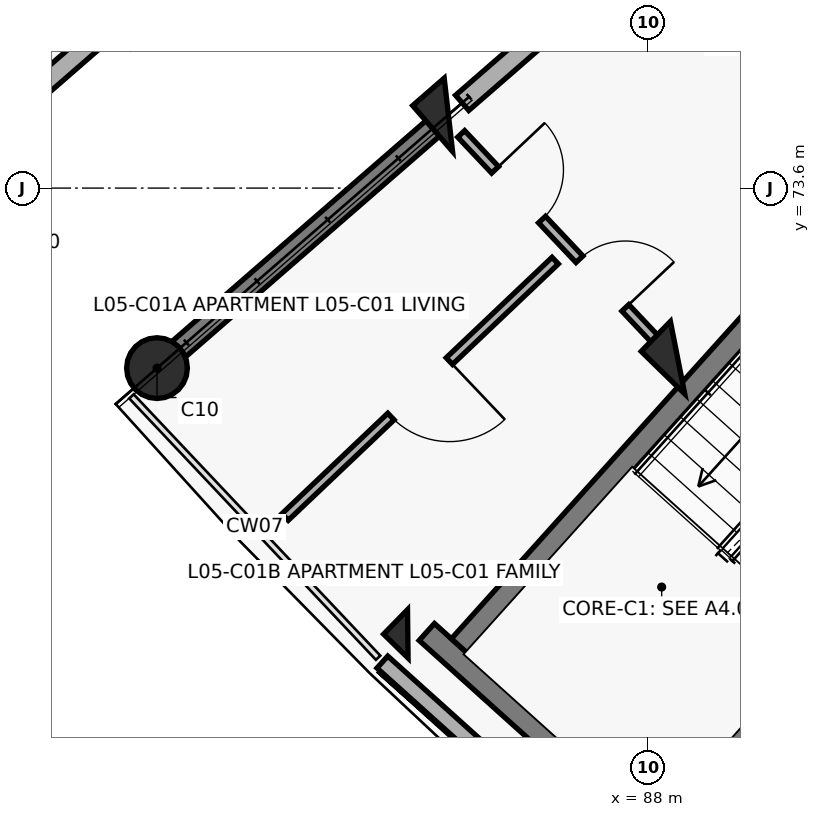
"""IFC4 building model, lengths in metres.
Left out: names, types, materials, properties, quantities, classifications, styles, units other than length and angle.
Written with IfcOpenShell. Run it as: python <this file> out.ifc"""

import sys

from ifc_helpers import new_model, si_unit, direction, frame, frame_2d, origin, origin_2d, place, context, subcontext, project, spatial, rectangle, circle, extrude, element, fill, save


model = new_model("IFC4")
c1 = context("Model", 3, precision=1e-05, world=origin(), true_north=direction((0.0, 1.0)))
c2 = subcontext(c1, "Body", "Model", "MODEL_VIEW")
j1 = project(units=[si_unit("LENGTHUNIT", "METRE"), si_unit("PLANEANGLEUNIT", "RADIAN")], contexts=[c1])
p1 = place(None, origin())
s1 = spatial("IfcSite", under=j1, at=p1, CompositionType="ELEMENT")
p2 = place(p1, origin())
s2 = spatial("IfcBuilding", under=s1, at=p2, CompositionType="ELEMENT")
p3 = place(p2, frame((0.0, 0.0, 17.4)))
s3 = spatial("IfcBuildingStorey", under=s2, at=p3, CompositionType="ELEMENT", Elevation=17.4)
p4 = place(p3, frame((85.377, 74.564, 0.0), z_axis=(0.0, 0.0, 1.0), x_axis=(-0.754709580223, -0.656059028991, 0.0)))
e1 = element("IfcColumn", 1, at=p4, inside=s3, PredefinedType="COLUMN", context=c2, shape_type="SweptSolid", body=[
    extrude(rectangle(XDim=0.55, YDim=0.8, at=origin_2d()), origin(), (0.0, 0.0, 1.0), 3.1),
])
p5 = place(p3, frame((81.543, 71.231, 0.0), z_axis=(0.0, 0.0, 1.0), x_axis=(-0.754709580223, -0.656059028991, 0.0)))
e2 = element("IfcColumn", 2, at=p5, inside=s3, PredefinedType="COLUMN", context=c2, shape_type="SweptSolid", body=[
    extrude(circle(Radius=0.4, at=origin_2d()), origin(), (0.0, 0.0, 1.0), 3.1),
])
p6 = place(p3, frame((88.392, 71.369, 0.0), z_axis=(0.0, 0.0, 1.0), x_axis=(-0.698665066769, -0.715448897181, 0.0)))
e3 = element("IfcColumn", 3, at=p6, inside=s3, PredefinedType="COLUMN", context=c2, shape_type="SweptSolid", body=[
    extrude(rectangle(XDim=0.55, YDim=0.8, at=origin_2d()), origin(), (0.0, 0.0, 1.0), 3.1),
])
p7 = place(p3, frame((84.843, 67.734, 0.0), z_axis=(0.0, 0.0, 1.0), x_axis=(-0.698665066769, -0.715448897181, 0.0)))
e4 = element("IfcColumn", 4, at=p7, inside=s3, PredefinedType="COLUMN", context=c2, shape_type="SweptSolid", body=[
    extrude(rectangle(XDim=0.45, YDim=0.45, at=origin_2d()), origin(), (0.0, 0.0, 1.0), 3.1),
])
p8 = place(p3, frame((85.241, 74.446, 0.0), z_axis=(0.0, 0.0, 1.0), x_axis=(-0.754703505217, -0.65606601742, 0.0)))
e5 = element("IfcWall", 5, at=p8, inside=s3, PredefinedType="SHEAR", context=c2, shape_type="SweptSolid", body=[
    extrude(rectangle(XDim=4.72, YDim=0.27, at=frame_2d((2.36, 0.0))), origin(), (0.0, 0.0, 1.0), 2.86),
])
p9 = place(p3, frame((79.234, 74.259, 0.0), z_axis=(0.0, 0.0, 1.0), x_axis=(0.754717680958, 0.656049710044, 0.0)))
e6 = element("IfcWall", 6, at=p9, inside=s3, PredefinedType="SOLIDWALL", context=c2, shape_type="SweptSolid", body=[
    extrude(rectangle(XDim=8.2, YDim=0.265, at=frame_2d((4.1, 0.0))), origin(), (0.0, 0.0, 1.0), 2.18),
])
p10 = place(p9, frame((3.59, 0.0, 0.75)))
e7 = element("IfcOpeningElement", 7, at=p10, cuts=e6, PredefinedType="OPENING", context=c2, shape_type="SweptSolid", body=[
    extrude(rectangle(XDim=1.35, YDim=1.35, at=frame_2d((0.675, 0.675))), frame((0.0, 0.142, 0.0), z_axis=(0.0, -1.0, 0.0), x_axis=(1.0, 0.0, 0.0)), (0.0, 0.0, 1.0), 0.285),
])
p11 = place(p3, frame((84.508, 67.363, 0.0), z_axis=(0.0, 0.0, 1.0), x_axis=(0.743387539862, -0.668860946369, 0.0)))
e8 = element("IfcWall", 8, at=p11, inside=s3, PredefinedType="SOLIDWALL", context=c2, shape_type="SweptSolid", body=[
    extrude(rectangle(XDim=4.809, YDim=0.212, at=frame_2d((2.405, 0.0))), origin(), (0.0, 0.0, 1.0), 2.25),
])
p12 = place(p3, frame((91.746, 80.101, 0.0), z_axis=(0.0, 0.0, 1.0), x_axis=(-0.754704866158, -0.656064451862, 0.0)))
e9 = element("IfcWall", 9, at=p12, inside=s3, PredefinedType="SOLIDWALL", context=c2, shape_type="SweptSolid", body=[
    extrude(rectangle(XDim=8.2, YDim=0.265, at=frame_2d((4.1, 0.0))), origin(), (0.0, 0.0, 1.0), 2.18),
])
p13 = place(p12, frame((3.59, 0.0, 0.75)))
e10 = element("IfcOpeningElement", 10, at=p13, cuts=e9, PredefinedType="OPENING", context=c2, shape_type="SweptSolid", body=[
    extrude(rectangle(XDim=1.35, YDim=1.35, at=frame_2d((0.675, 0.675))), frame((0.0, 0.142, 0.0), z_axis=(0.0, -1.0, 0.0), x_axis=(1.0, 0.0, 0.0)), (0.0, 0.0, 1.0), 0.285),
])
p14 = place(p3, frame((85.093, 67.76, 0.0), z_axis=(0.0, 0.0, 1.0), x_axis=(0.743372896184, -0.668877221333, 0.0)))
e11 = element("IfcWall", 11, at=p14, inside=s3, PredefinedType="SHEAR", context=c2, shape_type="SweptSolid", body=[
    extrude(rectangle(XDim=4.47, YDim=0.3, at=frame_2d((2.235, 0.0))), origin(), (0.0, 0.0, 1.0), 3.1),
])
p15 = place(p3, frame((90.671, 73.287, 0.0), z_axis=(0.0, 0.0, 1.0), x_axis=(-0.668885797871, -0.743365179038, 0.0)))
e12 = element("IfcWall", 12, at=p15, inside=s3, PredefinedType="SHEAR", context=c2, shape_type="SweptSolid", body=[
    extrude(rectangle(XDim=7.69, YDim=0.3, at=frame_2d((3.845, 0.0))), origin(), (0.0, 0.0, 1.0), 3.1),
])
p16 = place(p3, frame((93.325, 70.899, 0.0), z_axis=(0.0, 0.0, 1.0), x_axis=(-0.668868253964, -0.743380964808, 0.0)))
e13 = element("IfcWall", 13, at=p16, inside=s3, PredefinedType="SHEAR", context=c2, shape_type="SweptSolid", body=[
    extrude(rectangle(XDim=7.69, YDim=0.3, at=frame_2d((3.845, 0.0))), origin(), (0.0, 0.0, 1.0), 3.1),
])
p17 = place(p3, frame((87.994, 76.376, 0.0), z_axis=(0.0, 0.0, 1.0), x_axis=(0.686310507227, -0.727308660522, 0.0)))
e14 = element("IfcWall", 14, at=p17, inside=s3, PredefinedType="SOLIDWALL", context=c2, shape_type="SweptSolid", body=[
    extrude(rectangle(XDim=3.436, YDim=0.19, at=frame_2d((1.718, 0.0))), origin(), (0.0, 0.0, 1.0), 2.08),
])
p18 = place(p17, frame((1.208, 0.0, 0.0)))
e15 = element("IfcOpeningElement", 15, at=p18, cuts=e14, PredefinedType="OPENING", context=c2, shape_type="SweptSolid", body=[
    extrude(rectangle(XDim=1.02, YDim=2.15, at=frame_2d((0.51, 1.075))), frame((0.0, 0.105, 0.0), z_axis=(0.0, -1.0, 0.0), x_axis=(1.0, 0.0, 0.0)), (0.0, 0.0, 1.0), 0.21),
])
p19 = place(p3, frame((85.545, 74.313, 0.0), z_axis=(0.0, 0.0, 1.0), x_axis=(0.686332741542, -0.727287678906, 0.0)))
e16 = element("IfcWall", 16, at=p19, inside=s3, PredefinedType="PARTITIONING", context=c2, shape_type="SweptSolid", body=[
    extrude(rectangle(XDim=3.797, YDim=0.125, at=frame_2d((1.899, 0.0))), origin(), (0.0, 0.0, 1.0), 2.08),
])
p20 = place(p19, frame((0.65, 0.0, 0.0)))
e17 = element("IfcOpeningElement", 17, at=p20, cuts=e16, PredefinedType="OPENING", context=c2, shape_type="SweptSolid", body=[
    extrude(rectangle(XDim=0.9, YDim=2.1, at=frame_2d((0.45, 1.05))), frame((0.0, 0.073, 0.0), z_axis=(0.0, -1.0, 0.0), x_axis=(1.0, 0.0, 0.0)), (0.0, 0.0, 1.0), 0.145),
])
p21 = place(p19, frame((2.267, 0.0, 0.0)))
e18 = element("IfcOpeningElement", 18, at=p21, cuts=e16, PredefinedType="OPENING", context=c2, shape_type="SweptSolid", body=[
    extrude(rectangle(XDim=0.88, YDim=2.1, at=frame_2d((0.44, 1.05))), frame((0.0, 0.073, 0.0), z_axis=(0.0, -1.0, 0.0), x_axis=(1.0, 0.0, 0.0)), (0.0, 0.0, 1.0), 0.145),
])
p22 = place(p3, frame((86.782, 72.646, 0.0), z_axis=(0.0, 0.0, 1.0), x_axis=(-0.725204659953, -0.688533369694, 0.0)))
e19 = element("IfcWall", 19, at=p22, inside=s3, PredefinedType="PARTITIONING", context=c2, shape_type="SweptSolid", body=[
    extrude(rectangle(XDim=4.9, YDim=0.12, at=frame_2d((2.45, 0.0))), origin(), (0.0, 0.0, 1.0), 2.08),
])
p23 = place(p22, frame((1.92, 0.0, 0.0)))
e20 = element("IfcOpeningElement", 20, at=p23, cuts=e19, PredefinedType="OPENING", context=c2, shape_type="SweptSolid", body=[
    extrude(rectangle(XDim=1.06, YDim=2.1, at=frame_2d((0.53, 1.05))), frame((0.0, 0.07, 0.0), z_axis=(0.0, -1.0, 0.0), x_axis=(1.0, 0.0, 0.0)), (0.0, 0.0, 1.0), 0.14),
])
p24 = place(p18, origin())
e21 = element("IfcDoor", 21, at=p24, inside=s3, OperationType="SINGLE_SWING_LEFT", PredefinedType="DOOR", context=c2, shape_type="SweptSolid", body=[
    extrude(rectangle(XDim=1.02, YDim=2.15, at=frame_2d((0.51, 1.075))), frame((0.0, 0.025, 0.0), z_axis=(0.0, -1.0, 0.0), x_axis=(1.0, 0.0, 0.0)), (0.0, 0.0, 1.0), 0.05),
])
fill(e15, e21)
p25 = place(p20, origin())
e22 = element("IfcDoor", 22, at=p25, inside=s3, OperationType="SINGLE_SWING_LEFT", PredefinedType="DOOR", context=c2, shape_type="SweptSolid", body=[
    extrude(rectangle(XDim=0.9, YDim=2.1, at=frame_2d((0.45, 1.05))), frame((0.0, 0.025, 0.0), z_axis=(0.0, -1.0, 0.0), x_axis=(1.0, 0.0, 0.0)), (0.0, 0.0, 1.0), 0.05),
])
fill(e17, e22)
p26 = place(p21, origin())
e23 = element("IfcDoor", 23, at=p26, inside=s3, OperationType="SINGLE_SWING_RIGHT", PredefinedType="DOOR", context=c2, shape_type="SweptSolid", body=[
    extrude(rectangle(XDim=0.88, YDim=2.1, at=frame_2d((0.44, 1.05))), frame((0.0, 0.025, 0.0), z_axis=(0.0, -1.0, 0.0), x_axis=(1.0, 0.0, 0.0)), (0.0, 0.0, 1.0), 0.05),
])
fill(e18, e23)
p27 = place(p23, origin())
e24 = element("IfcDoor", 24, at=p27, inside=s3, OperationType="SINGLE_SWING_LEFT", PredefinedType="DOOR", context=c2, shape_type="SweptSolid", body=[
    extrude(rectangle(XDim=1.06, YDim=2.1, at=frame_2d((0.53, 1.05))), frame((0.0, 0.025, 0.0), z_axis=(0.0, -1.0, 0.0), x_axis=(1.0, 0.0, 0.0)), (0.0, 0.0, 1.0), 0.05),
])
fill(e20, e24)
save(model, sys.argv[1])
